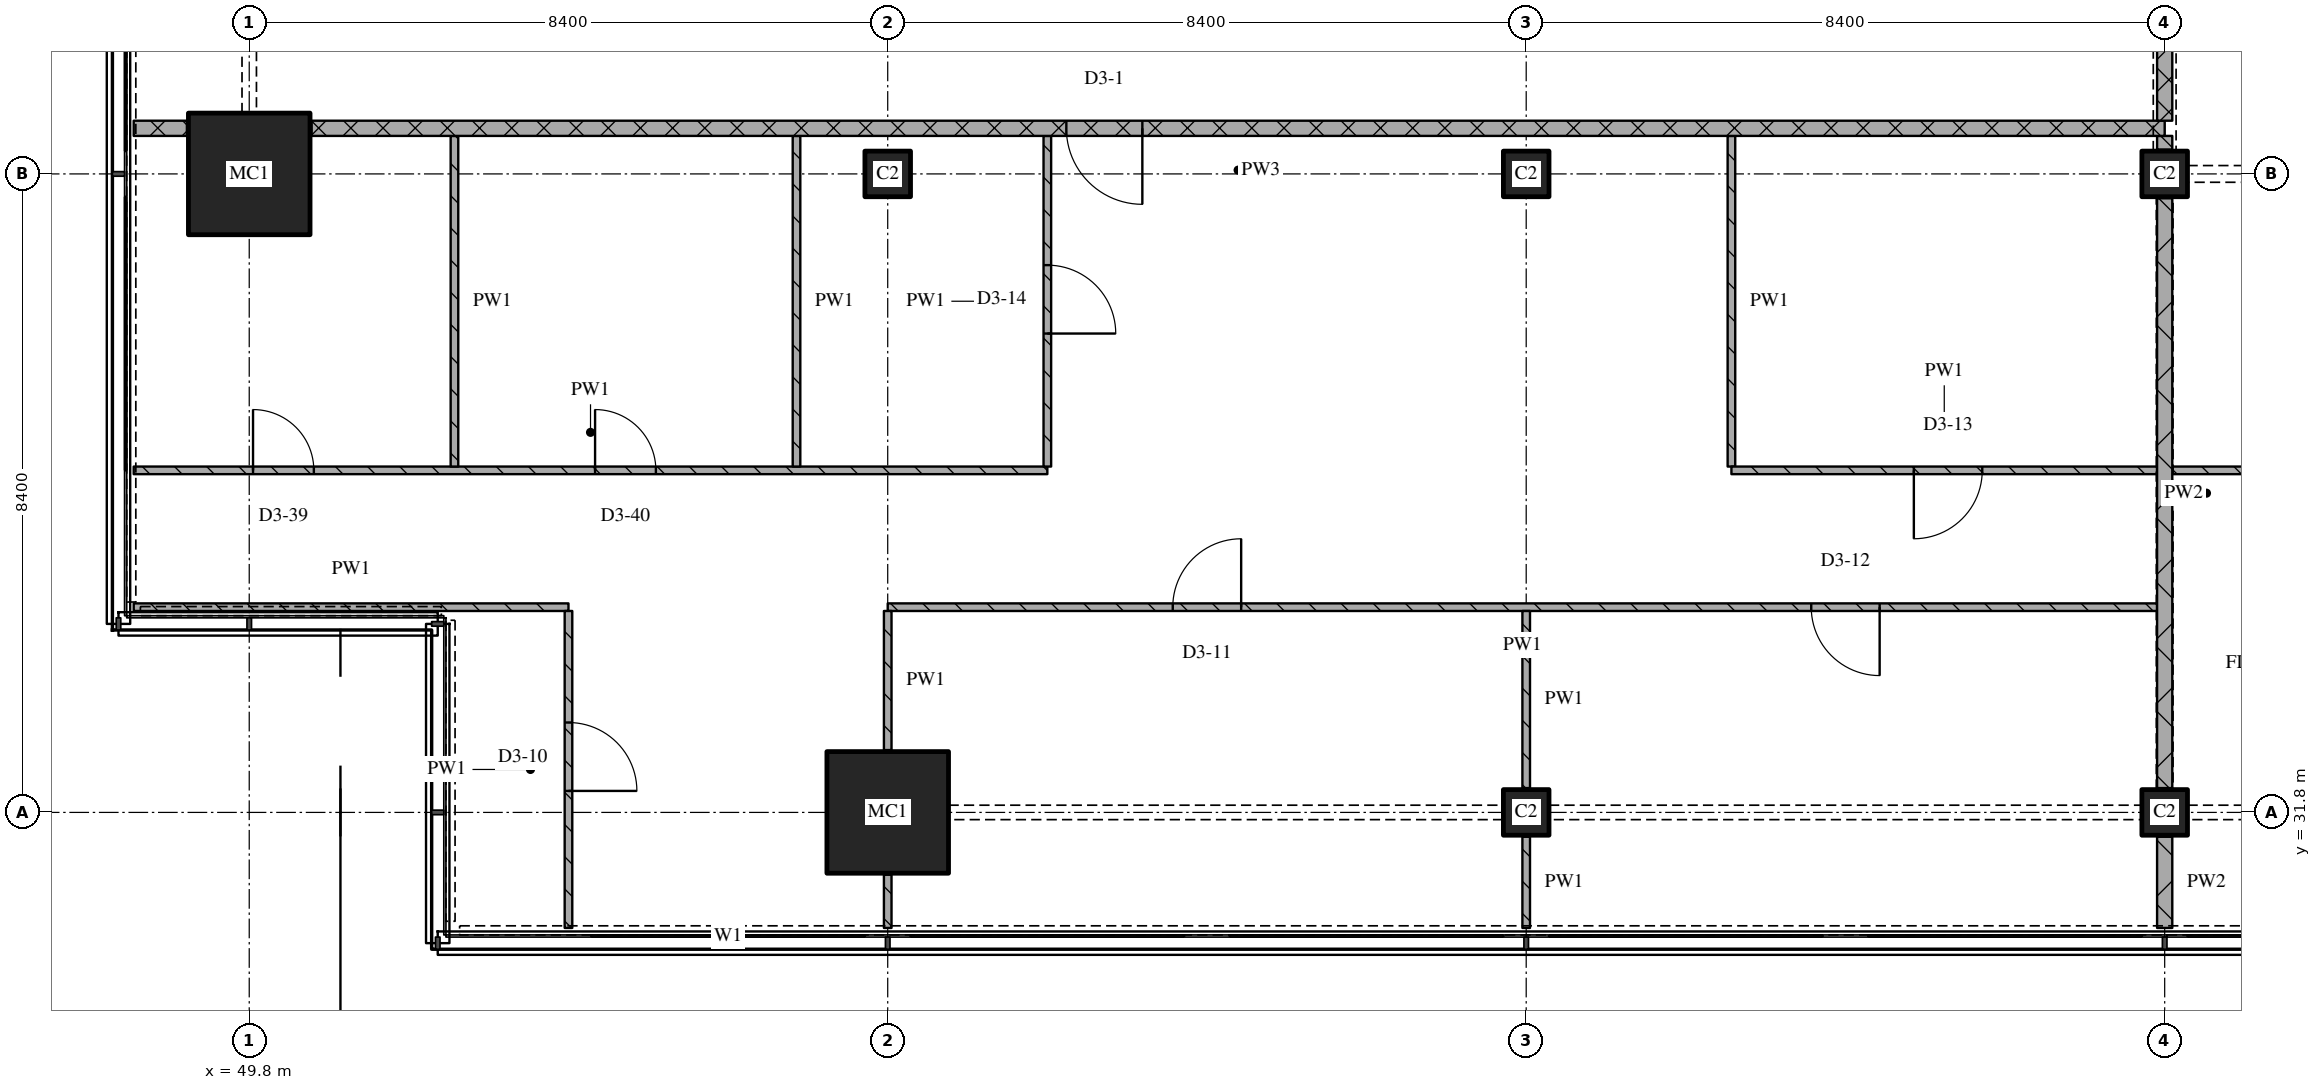
"""IFC4 building model, lengths in metres.
Left out: names, types, materials, properties, quantities, classifications, styles, units other than length and angle.
Written with IfcOpenShell. Run it as: python <this file> out.ifc"""

import sys

from ifc_helpers import new_model, si_unit, direction, frame, frame_2d, origin, origin_2d, place, context, subcontext, project, spatial, rectangle, extrude, element, fill, save


model = new_model("IFC4")
c1 = context("Model", 3, precision=1e-05, world=origin(), true_north=direction((0.0, 1.0)))
c2 = subcontext(c1, "Body", "Model", "MODEL_VIEW")
j1 = project(units=[si_unit("LENGTHUNIT", "METRE"), si_unit("PLANEANGLEUNIT", "RADIAN")], contexts=[c1])
p1 = place(None, origin())
s1 = spatial("IfcSite", under=j1, at=p1, CompositionType="ELEMENT")
p2 = place(p1, origin())
s2 = spatial("IfcBuilding", under=s1, at=p2, CompositionType="ELEMENT")
p3 = place(p2, frame((0.0, 0.0, 227.1)))
s3 = spatial("IfcBuildingStorey", under=s2, at=p3, CompositionType="ELEMENT", Elevation=227.1)
for number, where, z_axis, x_axis in (
    (1, (49.8, 40.2, 0.0), (0.0, 0.0, 1.0), (1.0, 0.0, 0.0)),
    (2, (58.2, 31.8, 0.0), (0.0, 0.0, 1.0), (1.0, 0.0, 0.0)),
):
    element("IfcColumn", number, at=place(p3, frame(where, z_axis=z_axis, x_axis=x_axis)), inside=s3, PredefinedType="COLUMN", context=c2, shape_type="SweptSolid", body=[
        extrude(rectangle(XDim=1.6, YDim=1.6, at=origin_2d()), origin(), (0.0, 0.0, 1.0), 3.6),
    ])
for number, where, z_axis, x_axis in (
    (3, (58.2, 40.2, 0.0), (0.0, 0.0, 1.0), (1.0, 0.0, 0.0)),
    (4, (66.6, 31.8, 0.0), (0.0, 0.0, 1.0), (1.0, 0.0, 0.0)),
    (5, (66.6, 40.2, 0.0), (0.0, 0.0, 1.0), (1.0, 0.0, 0.0)),
    (6, (75.0, 31.8, 0.0), (0.0, 0.0, 1.0), (1.0, 0.0, 0.0)),
    (7, (75.0, 40.2, 0.0), (0.0, 0.0, 1.0), (1.0, 0.0, 0.0)),
):
    element("IfcColumn", number, at=place(p3, frame(where, z_axis=z_axis, x_axis=x_axis)), inside=s3, PredefinedType="COLUMN", context=c2, shape_type="SweptSolid", body=[
        extrude(rectangle(XDim=0.6, YDim=0.6, at=origin_2d()), origin(), (0.0, 0.0, 1.0), 3.6),
    ])
p4 = place(p3, frame((48.28, 34.5, 0.0), z_axis=(0.0, 0.0, 1.0), x_axis=(1.0, 0.0, 0.0)))
e8 = element("IfcWall", 8, at=p4, inside=s3, PredefinedType="PARTITIONING", context=c2, shape_type="SweptSolid", body=[
    extrude(rectangle(XDim=5.72, YDim=0.1, at=frame_2d((2.86, 0.0))), origin(), (0.0, 0.0, 1.0), 3.32),
])
p5 = place(p3, frame((74.9, 34.5, 0.0), z_axis=(0.0, 0.0, 1.0), x_axis=(-1.0, 0.0, 0.0)))
e9 = element("IfcWall", 9, at=p5, inside=s3, PredefinedType="PARTITIONING", context=c2, shape_type="SweptSolid", body=[
    extrude(rectangle(XDim=16.7, YDim=0.1, at=frame_2d((8.35, 0.0))), origin(), (0.0, 0.0, 1.0), 3.32),
])
p6 = place(p5, frame((3.65, 0.0, 0.0)))
e10 = element("IfcOpeningElement", 10, at=p6, cuts=e9, PredefinedType="OPENING", context=c2, shape_type="SweptSolid", body=[
    extrude(rectangle(XDim=0.9, YDim=2.1, at=frame_2d((0.45, 1.05))), frame((0.0, 0.06, 0.0), z_axis=(0.0, -1.0, 0.0), x_axis=(1.0, 0.0, 0.0)), (0.0, 0.0, 1.0), 0.12),
])
p7 = place(p5, frame((12.05, 0.0, 0.0)))
e11 = element("IfcOpeningElement", 11, at=p7, cuts=e9, PredefinedType="OPENING", context=c2, shape_type="SweptSolid", body=[
    extrude(rectangle(XDim=0.9, YDim=2.1, at=frame_2d((0.45, 1.05))), frame((0.0, 0.06, 0.0), z_axis=(0.0, -1.0, 0.0), x_axis=(1.0, 0.0, 0.0)), (0.0, 0.0, 1.0), 0.12),
])
p8 = place(p3, frame((48.28, 36.3, 0.0), z_axis=(0.0, 0.0, 1.0), x_axis=(1.0, 0.0, 0.0)))
e12 = element("IfcWall", 12, at=p8, inside=s3, PredefinedType="PARTITIONING", context=c2, shape_type="SweptSolid", body=[
    extrude(rectangle(XDim=12.02, YDim=0.1, at=frame_2d((6.01, 0.0))), origin(), (0.0, 0.0, 1.0), 3.32),
])
p9 = place(p8, frame((1.57, 0.0, 0.0)))
e13 = element("IfcOpeningElement", 13, at=p9, cuts=e12, PredefinedType="OPENING", context=c2, shape_type="SweptSolid", body=[
    extrude(rectangle(XDim=0.8, YDim=2.1, at=frame_2d((0.4, 1.05))), frame((0.0, 0.06, 0.0), z_axis=(0.0, -1.0, 0.0), x_axis=(1.0, 0.0, 0.0)), (0.0, 0.0, 1.0), 0.12),
])
p10 = place(p8, frame((6.07, 0.0, 0.0)))
e14 = element("IfcOpeningElement", 14, at=p10, cuts=e12, PredefinedType="OPENING", context=c2, shape_type="SweptSolid", body=[
    extrude(rectangle(XDim=0.8, YDim=2.1, at=frame_2d((0.4, 1.05))), frame((0.0, 0.06, 0.0), z_axis=(0.0, -1.0, 0.0), x_axis=(1.0, 0.0, 0.0)), (0.0, 0.0, 1.0), 0.12),
])
p11 = place(p3, frame((48.28, 40.8, 0.0), z_axis=(0.0, 0.0, 1.0), x_axis=(1.0, 0.0, 0.0)))
e15 = element("IfcWall", 15, at=p11, inside=s3, PredefinedType="PARTITIONING", context=c2, shape_type="SweptSolid", body=[
    extrude(rectangle(XDim=0.7, YDim=0.2, at=frame_2d((0.35, 0.0))), origin(), (0.0, 0.0, 1.0), 3.32),
])
p12 = place(p3, frame((75.0, 40.8, 0.0), z_axis=(0.0, 0.0, 1.0), x_axis=(-1.0, 0.0, 0.0)))
e16 = element("IfcWall", 16, at=p12, inside=s3, PredefinedType="PARTITIONING", context=c2, shape_type="SweptSolid", body=[
    extrude(rectangle(XDim=24.38, YDim=0.2, at=frame_2d((12.19, 0.0))), origin(), (0.0, 0.0, 1.0), 3.32),
])
p13 = place(p12, frame((13.45, 0.0, 0.0)))
e17 = element("IfcOpeningElement", 17, at=p13, cuts=e16, PredefinedType="OPENING", context=c2, shape_type="SweptSolid", body=[
    extrude(rectangle(XDim=1.0, YDim=2.1, at=frame_2d((0.5, 1.05))), frame((0.0, 0.11, 0.0), z_axis=(0.0, -1.0, 0.0), x_axis=(1.0, 0.0, 0.0)), (0.0, 0.0, 1.0), 0.22),
])
p14 = place(p3, frame((52.5, 40.7, 0.0), z_axis=(0.0, 0.0, 1.0), x_axis=(0.0, -1.0, 0.0)))
e18 = element("IfcWall", 18, at=p14, inside=s3, PredefinedType="PARTITIONING", context=c2, shape_type="SweptSolid", body=[
    extrude(rectangle(XDim=4.35, YDim=0.1, at=frame_2d((2.175, 0.0))), origin(), (0.0, 0.0, 1.0), 3.32),
])
p15 = place(p3, frame((54.0, 30.28, 0.0), z_axis=(0.0, 0.0, 1.0), x_axis=(0.0, 1.0, 0.0)))
e19 = element("IfcWall", 19, at=p15, inside=s3, PredefinedType="PARTITIONING", context=c2, shape_type="SweptSolid", body=[
    extrude(rectangle(XDim=4.17, YDim=0.1, at=frame_2d((2.085, 0.0))), origin(), (0.0, 0.0, 1.0), 3.32),
])
p16 = place(p15, frame((1.803, 0.0, 0.0)))
e20 = element("IfcOpeningElement", 20, at=p16, cuts=e19, PredefinedType="OPENING", context=c2, shape_type="SweptSolid", body=[
    extrude(rectangle(XDim=0.9, YDim=2.1, at=frame_2d((0.45, 1.05))), frame((0.0, 0.06, 0.0), z_axis=(0.0, -1.0, 0.0), x_axis=(1.0, 0.0, 0.0)), (0.0, 0.0, 1.0), 0.12),
])
p17 = place(p3, frame((57.0, 40.7, 0.0), z_axis=(0.0, 0.0, 1.0), x_axis=(0.0, -1.0, 0.0)))
e21 = element("IfcWall", 21, at=p17, inside=s3, PredefinedType="PARTITIONING", context=c2, shape_type="SweptSolid", body=[
    extrude(rectangle(XDim=4.35, YDim=0.1, at=frame_2d((2.175, 0.0))), origin(), (0.0, 0.0, 1.0), 3.32),
])
p18 = place(p3, frame((58.2, 30.98, 0.0), z_axis=(0.0, 0.0, 1.0), x_axis=(0.0, -1.0, 0.0)))
e22 = element("IfcWall", 22, at=p18, inside=s3, PredefinedType="PARTITIONING", context=c2, shape_type="SweptSolid", body=[
    extrude(rectangle(XDim=0.7, YDim=0.1, at=frame_2d((0.35, 0.0))), origin(), (0.0, 0.0, 1.0), 3.32),
])
p19 = place(p3, frame((58.2, 34.45, 0.0), z_axis=(0.0, 0.0, 1.0), x_axis=(0.0, -1.0, 0.0)))
e23 = element("IfcWall", 23, at=p19, inside=s3, PredefinedType="PARTITIONING", context=c2, shape_type="SweptSolid", body=[
    extrude(rectangle(XDim=1.83, YDim=0.1, at=frame_2d((0.915, 0.0))), origin(), (0.0, 0.0, 1.0), 3.32),
])
p20 = place(p3, frame((60.3, 36.35, 0.0), z_axis=(0.0, 0.0, 1.0), x_axis=(0.0, 1.0, 0.0)))
e24 = element("IfcWall", 24, at=p20, inside=s3, PredefinedType="PARTITIONING", context=c2, shape_type="SweptSolid", body=[
    extrude(rectangle(XDim=4.35, YDim=0.1, at=frame_2d((2.175, 0.0))), origin(), (0.0, 0.0, 1.0), 3.32),
])
p21 = place(p20, frame((1.75, 0.0, 0.0)))
e25 = element("IfcOpeningElement", 25, at=p21, cuts=e24, PredefinedType="OPENING", context=c2, shape_type="SweptSolid", body=[
    extrude(rectangle(XDim=0.9, YDim=2.1, at=frame_2d((0.45, 1.05))), frame((0.0, 0.06, 0.0), z_axis=(0.0, -1.0, 0.0), x_axis=(1.0, 0.0, 0.0)), (0.0, 0.0, 1.0), 0.12),
])
p22 = place(p3, frame((66.6, 31.48, 0.0), z_axis=(0.0, 0.0, 1.0), x_axis=(0.0, -1.0, 0.0)))
e26 = element("IfcWall", 26, at=p22, inside=s3, PredefinedType="PARTITIONING", context=c2, shape_type="SweptSolid", body=[
    extrude(rectangle(XDim=1.2, YDim=0.1, at=frame_2d((0.6, 0.0))), origin(), (0.0, 0.0, 1.0), 3.32),
])
p23 = place(p3, frame((66.6, 34.45, 0.0), z_axis=(0.0, 0.0, 1.0), x_axis=(0.0, -1.0, 0.0)))
e27 = element("IfcWall", 27, at=p23, inside=s3, PredefinedType="PARTITIONING", context=c2, shape_type="SweptSolid", body=[
    extrude(rectangle(XDim=2.33, YDim=0.1, at=frame_2d((1.165, 0.0))), origin(), (0.0, 0.0, 1.0), 3.32),
])
p24 = place(p3, frame((69.3, 40.7, 0.0), z_axis=(0.0, 0.0, 1.0), x_axis=(0.0, -1.0, 0.0)))
e28 = element("IfcWall", 28, at=p24, inside=s3, PredefinedType="PARTITIONING", context=c2, shape_type="SweptSolid", body=[
    extrude(rectangle(XDim=4.35, YDim=0.1, at=frame_2d((2.175, 0.0))), origin(), (0.0, 0.0, 1.0), 3.32),
])
p25 = place(p3, frame((75.0, 43.1, 0.0), z_axis=(0.0, 0.0, 1.0), x_axis=(0.0, -1.0, 0.0)))
e29 = element("IfcWall", 29, at=p25, inside=s3, PredefinedType="PARTITIONING", context=c2, shape_type="SweptSolid", body=[
    extrude(rectangle(XDim=2.2, YDim=0.2, at=frame_2d((1.1, 0.0))), origin(), (0.0, 0.0, 1.0), 2.53),
])
p26 = place(p3, frame((75.0, 31.48, 0.0), z_axis=(0.0, 0.0, 1.0), x_axis=(0.0, -1.0, 0.0)))
e30 = element("IfcWall", 30, at=p26, inside=s3, PredefinedType="PARTITIONING", context=c2, shape_type="SweptSolid", body=[
    extrude(rectangle(XDim=1.2, YDim=0.2, at=frame_2d((0.6, 0.0))), origin(), (0.0, 0.0, 1.0), 3.32),
])
p27 = place(p3, frame((75.0, 39.88, 0.0), z_axis=(0.0, 0.0, 1.0), x_axis=(0.0, -1.0, 0.0)))
e31 = element("IfcWall", 31, at=p27, inside=s3, PredefinedType="PARTITIONING", context=c2, shape_type="SweptSolid", body=[
    extrude(rectangle(XDim=7.76, YDim=0.2, at=frame_2d((3.88, 0.0))), origin(), (0.0, 0.0, 1.0), 2.72),
])
p28 = place(p3, frame((75.0, 40.7, 0.0), z_axis=(0.0, 0.0, 1.0), x_axis=(0.0, -1.0, 0.0)))
e32 = element("IfcWall", 32, at=p28, inside=s3, PredefinedType="PARTITIONING", context=c2, shape_type="SweptSolid", body=[
    extrude(rectangle(XDim=0.18, YDim=0.2, at=frame_2d((0.09, 0.0))), origin(), (0.0, 0.0, 1.0), 3.32),
])
p29 = place(p3, frame((69.3, 36.3, 0.0), z_axis=(0.0, 0.0, 1.0), x_axis=(1.0, 0.0, 0.0)))
e33 = element("IfcWall", 33, at=p29, inside=s3, PredefinedType="PARTITIONING", context=c2, shape_type="SweptSolid", body=[
    extrude(rectangle(XDim=5.6, YDim=0.1, at=frame_2d((2.8, 0.0))), origin(), (0.0, 0.0, 1.0), 3.32),
])
p30 = place(p29, frame((2.4, 0.0, 0.0)))
e34 = element("IfcOpeningElement", 34, at=p30, cuts=e33, PredefinedType="OPENING", context=c2, shape_type="SweptSolid", body=[
    extrude(rectangle(XDim=0.9, YDim=2.1, at=frame_2d((0.45, 1.05))), frame((0.0, 0.06, 0.0), z_axis=(0.0, -1.0, 0.0), x_axis=(1.0, 0.0, 0.0)), (0.0, 0.0, 1.0), 0.12),
])
p31 = place(p3, frame((75.1, 36.3, 0.0), z_axis=(0.0, 0.0, 1.0), x_axis=(1.0, 0.0, 0.0)))
e35 = element("IfcWall", 35, at=p31, inside=s3, PredefinedType="PARTITIONING", context=c2, shape_type="SweptSolid", body=[
    extrude(rectangle(XDim=10.4, YDim=0.1, at=frame_2d((5.2, 0.0))), origin(), (0.0, 0.0, 1.0), 3.32),
])
p32 = place(p31, frame((1.42, 0.0, 0.0)))
e36 = element("IfcOpeningElement", 36, at=p32, cuts=e35, PredefinedType="OPENING", context=c2, shape_type="SweptSolid", body=[
    extrude(rectangle(XDim=0.8, YDim=2.1, at=frame_2d((0.4, 1.05))), frame((0.0, 0.06, 0.0), z_axis=(0.0, -1.0, 0.0), x_axis=(1.0, 0.0, 0.0)), (0.0, 0.0, 1.0), 0.12),
])
p33 = place(p31, frame((5.261, 0.0, 0.0)))
e37 = element("IfcOpeningElement", 37, at=p33, cuts=e35, PredefinedType="OPENING", context=c2, shape_type="SweptSolid", body=[
    extrude(rectangle(XDim=0.8, YDim=2.1, at=frame_2d((0.4, 1.05))), frame((0.0, 0.06, 0.0), z_axis=(0.0, -1.0, 0.0), x_axis=(1.0, 0.0, 0.0)), (0.0, 0.0, 1.0), 0.12),
])
p34 = place(p31, frame((8.541, 0.0, 0.0)))
e38 = element("IfcOpeningElement", 38, at=p34, cuts=e35, PredefinedType="OPENING", context=c2, shape_type="SweptSolid", body=[
    extrude(rectangle(XDim=0.9, YDim=2.1, at=frame_2d((0.45, 1.05))), frame((0.0, 0.06, 0.0), z_axis=(0.0, -1.0, 0.0), x_axis=(1.0, 0.0, 0.0)), (0.0, 0.0, 1.0), 0.12),
])
p35 = place(p6, origin())
e39 = element("IfcDoor", 39, at=p35, inside=s3, OperationType="SINGLE_SWING_LEFT", PredefinedType="DOOR", context=c2, shape_type="SweptSolid", body=[
    extrude(rectangle(XDim=0.9, YDim=2.1, at=frame_2d((0.45, 1.05))), frame((0.0, 0.025, 0.0), z_axis=(0.0, -1.0, 0.0), x_axis=(1.0, 0.0, 0.0)), (0.0, 0.0, 1.0), 0.05),
])
fill(e10, e39)
p36 = place(p7, origin())
e40 = element("IfcDoor", 40, at=p36, inside=s3, OperationType="SINGLE_SWING_RIGHT", PredefinedType="DOOR", context=c2, shape_type="SweptSolid", body=[
    extrude(rectangle(XDim=0.9, YDim=2.1, at=frame_2d((0.45, 1.05))), frame((0.0, 0.025, 0.0), z_axis=(0.0, -1.0, 0.0), x_axis=(1.0, 0.0, 0.0)), (0.0, 0.0, 1.0), 0.05),
])
fill(e11, e40)
p37 = place(p9, origin())
e41 = element("IfcDoor", 41, at=p37, inside=s3, OperationType="SINGLE_SWING_LEFT", PredefinedType="DOOR", context=c2, shape_type="SweptSolid", body=[
    extrude(rectangle(XDim=0.8, YDim=2.1, at=frame_2d((0.4, 1.05))), frame((0.0, 0.025, 0.0), z_axis=(0.0, -1.0, 0.0), x_axis=(1.0, 0.0, 0.0)), (0.0, 0.0, 1.0), 0.05),
])
fill(e13, e41)
p38 = place(p10, origin())
e42 = element("IfcDoor", 42, at=p38, inside=s3, OperationType="SINGLE_SWING_LEFT", PredefinedType="DOOR", context=c2, shape_type="SweptSolid", body=[
    extrude(rectangle(XDim=0.8, YDim=2.1, at=frame_2d((0.4, 1.05))), frame((0.0, 0.025, 0.0), z_axis=(0.0, -1.0, 0.0), x_axis=(1.0, 0.0, 0.0)), (0.0, 0.0, 1.0), 0.05),
])
fill(e14, e42)
p39 = place(p13, origin())
e43 = element("IfcDoor", 43, at=p39, inside=s3, OperationType="SINGLE_SWING_LEFT", PredefinedType="DOOR", context=c2, shape_type="SweptSolid", body=[
    extrude(rectangle(XDim=1.0, YDim=2.1, at=frame_2d((0.5, 1.05))), frame((0.0, 0.025, 0.0), z_axis=(0.0, -1.0, 0.0), x_axis=(1.0, 0.0, 0.0)), (0.0, 0.0, 1.0), 0.05),
])
fill(e17, e43)
p40 = place(p16, origin())
e44 = element("IfcDoor", 44, at=p40, inside=s3, OperationType="SINGLE_SWING_RIGHT", PredefinedType="DOOR", context=c2, shape_type="SweptSolid", body=[
    extrude(rectangle(XDim=0.9, YDim=2.1, at=frame_2d((0.45, 1.05))), frame((0.0, 0.025, 0.0), z_axis=(0.0, -1.0, 0.0), x_axis=(1.0, 0.0, 0.0)), (0.0, 0.0, 1.0), 0.05),
])
fill(e20, e44)
p41 = place(p21, origin())
e45 = element("IfcDoor", 45, at=p41, inside=s3, OperationType="SINGLE_SWING_RIGHT", PredefinedType="DOOR", context=c2, shape_type="SweptSolid", body=[
    extrude(rectangle(XDim=0.9, YDim=2.1, at=frame_2d((0.45, 1.05))), frame((0.0, 0.025, 0.0), z_axis=(0.0, -1.0, 0.0), x_axis=(1.0, 0.0, 0.0)), (0.0, 0.0, 1.0), 0.05),
])
fill(e25, e45)
p42 = place(p30, origin())
e46 = element("IfcDoor", 46, at=p42, inside=s3, OperationType="SINGLE_SWING_RIGHT", PredefinedType="DOOR", context=c2, shape_type="SweptSolid", body=[
    extrude(rectangle(XDim=0.9, YDim=2.1, at=frame_2d((0.45, 1.05))), frame((0.0, 0.025, 0.0), z_axis=(0.0, -1.0, 0.0), x_axis=(1.0, 0.0, 0.0)), (0.0, 0.0, 1.0), 0.05),
])
fill(e34, e46)
save(model, sys.argv[1])
